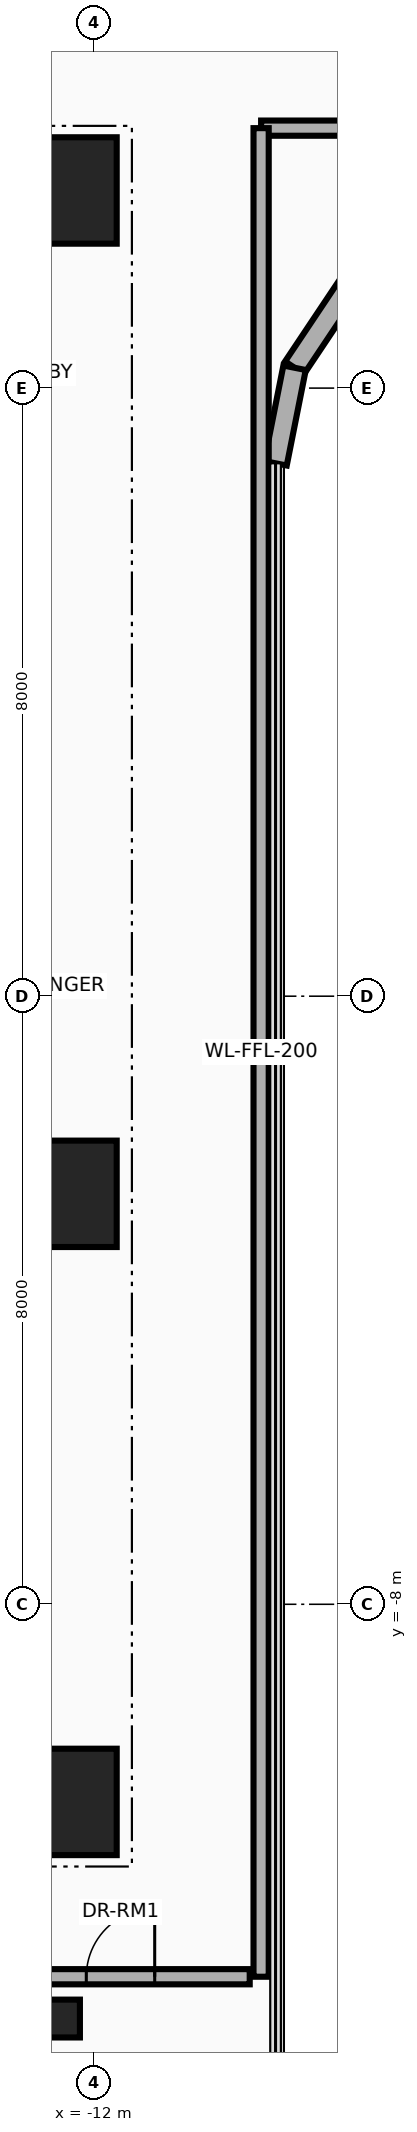
"""IFC4 building model, lengths in metres.
Left out: names, types, materials, properties, quantities, classifications, styles, units other than length and angle.
Written with IfcOpenShell. Run it as: python <this file> out.ifc"""

import sys

from ifc_helpers import new_model, si_unit, direction, frame, frame_2d, origin, origin_2d, place, context, subcontext, project, spatial, rectangle, i_section, extrude, source, transform, mapped, element, fill, save


model = new_model("IFC4")
c1 = context("Model", 3, precision=1e-05, world=origin(), true_north=direction((0.0, 1.0)))
c2 = subcontext(c1, "Body", "Model", "MODEL_VIEW")
j1 = project(units=[si_unit("LENGTHUNIT", "METRE"), si_unit("PLANEANGLEUNIT", "RADIAN")], contexts=[c1])
p1 = place(None, origin())
s1 = spatial("IfcSite", under=j1, at=p1, CompositionType="ELEMENT")
p2 = place(p1, origin())
s2 = spatial("IfcBuilding", under=s1, at=p2, CompositionType="ELEMENT")
p3 = place(p2, frame((0.0, 0.0, 96.3)))
s3 = spatial("IfcBuildingStorey", under=s2, at=p3, CompositionType="ELEMENT", Elevation=96.3)
for number, where, z_axis, x_axis in (
    (1, (-22.65, 10.8, 0.0), (0.0, 0.0, 1.0), (1.0, 0.0, 0.0)),
    (2, (-22.65, -10.8, 0.0), (0.0, 0.0, 1.0), (1.0, 0.0, 0.0)),
):
    element("IfcWall", number, at=place(p3, frame(where, z_axis=z_axis, x_axis=x_axis)), inside=s3, PredefinedType="SHEAR", context=c2, shape_type="SweptSolid", body=[
        extrude(rectangle(XDim=10.25, YDim=0.7, at=frame_2d((5.125, 0.0))), origin(), (0.0, 0.0, 1.0), 4.56),
    ])
m1 = source(origin(), c2, "Body", "SweptSolid", [
    extrude(rectangle(XDim=1.4, YDim=1.4, at=origin_2d()), origin(), (0.0, 0.0, 1.0), 4.8),
])
for number, where, z_axis, x_axis in (
    (3, (-12.4, -10.6, 0.0), (0.0, 0.0, 1.0), (1.0, 0.0, 0.0)),
    (4, (-12.4, -2.6, 0.0), (0.0, 0.0, 1.0), (1.0, 0.0, 0.0)),
    (5, (-12.4, 10.6, 0.0), (0.0, 0.0, 1.0), (1.0, 0.0, 0.0)),
):
    element("IfcColumn", number, at=place(p3, frame(where, z_axis=z_axis, x_axis=x_axis)), inside=s3, PredefinedType="COLUMN", context=c2, shape_type="MappedRepresentation", body=[
        mapped(m1, transform((0.0, 0.0, 0.0), x_axis=(1.0, 0.0, 0.0), y_axis=(0.0, 1.0, 0.0), z_axis=(0.0, 0.0, 1.0), scale=1.0)),
    ])
m2 = source(origin(), c2, "Body", "SweptSolid", [
    extrude(i_section(OverallWidth=0.432, OverallDepth=0.498, WebThickness=0.056, FlangeThickness=0.089, at=origin_2d()), origin(), (0.0, 0.0, 1.0), 4.8),
])
p4 = place(p3, frame((-12.4, -13.45, 0.0), z_axis=(0.0, 0.0, 1.0), x_axis=(1.0, 0.0, 0.0)))
e6 = element("IfcColumn", 6, at=p4, inside=s3, PredefinedType="COLUMN", context=c2, shape_type="MappedRepresentation", body=[
    mapped(m2, transform((0.0, 0.0, 0.0), x_axis=(1.0, 0.0, 0.0), y_axis=(0.0, 1.0, 0.0), z_axis=(0.0, 0.0, 1.0), scale=1.0)),
])
p5 = place(p3, frame((-8.642, 9.342, 0.0), z_axis=(0.0, 0.0, 1.0), x_axis=(-0.555615398575, -0.831439431869, 0.0)))
e7 = element("IfcWall", 7, at=p5, inside=s3, PredefinedType="SOLIDWALL", context=c2, shape_type="SweptSolid", body=[
    extrude(rectangle(XDim=1.292, YDim=0.3, at=frame_2d((0.646, 0.0))), origin(), (0.0, 0.0, 1.0), 4.56),
])
p6 = place(p3, frame((-9.36, 8.268, 0.0), z_axis=(0.0, 0.0, 1.0), x_axis=(-0.195090163074, -0.980785312019, 0.0)))
e8 = element("IfcWall", 8, at=p6, inside=s3, PredefinedType="SOLIDWALL", context=c2, shape_type="SweptSolid", body=[
    extrude(rectangle(XDim=1.281, YDim=0.3, at=frame_2d((0.641, 0.0))), origin(), (0.0, 0.0, 1.0), 4.56),
])
p7 = place(p3, frame((-22.0, -12.9, 0.0), z_axis=(0.0, 0.0, 1.0), x_axis=(1.0, 0.0, 0.0)))
e9 = element("IfcWall", 9, at=p7, inside=s3, PredefinedType="PARTITIONING", context=c2, shape_type="SweptSolid", body=[
    extrude(rectangle(XDim=12.05, YDim=0.2, at=frame_2d((6.025, 0.0))), origin(), (0.0, 0.0, 1.0), 3.934),
])
p8 = place(p7, frame((1.4, 0.0, 0.0)))
e10 = element("IfcOpeningElement", 10, at=p8, cuts=e9, PredefinedType="OPENING", context=c2, shape_type="SweptSolid", body=[
    extrude(rectangle(XDim=0.9, YDim=2.1, at=frame_2d((0.45, 1.05))), frame((0.0, 0.115, 0.0), z_axis=(0.0, -1.0, 0.0), x_axis=(1.0, 0.0, 0.0)), (0.0, 0.0, 1.0), 0.23),
])
p9 = place(p7, frame((5.4, 0.0, 0.0)))
e11 = element("IfcOpeningElement", 11, at=p9, cuts=e9, PredefinedType="OPENING", context=c2, shape_type="SweptSolid", body=[
    extrude(rectangle(XDim=0.9, YDim=2.1, at=frame_2d((0.45, 1.05))), frame((0.0, 0.115, 0.0), z_axis=(0.0, -1.0, 0.0), x_axis=(1.0, 0.0, 0.0)), (0.0, 0.0, 1.0), 0.23),
])
p10 = place(p7, frame((9.9, 0.0, 0.0)))
e12 = element("IfcOpeningElement", 12, at=p10, cuts=e9, PredefinedType="OPENING", context=c2, shape_type="SweptSolid", body=[
    extrude(rectangle(XDim=0.9, YDim=2.1, at=frame_2d((0.45, 1.05))), frame((0.0, 0.115, 0.0), z_axis=(0.0, -1.0, 0.0), x_axis=(1.0, 0.0, 0.0)), (0.0, 0.0, 1.0), 0.23),
])
p11 = place(p3, frame((-9.8, 11.42, 0.0), z_axis=(0.0, 0.0, 1.0), x_axis=(1.0, 0.0, 0.0)))
e13 = element("IfcWall", 13, at=p11, inside=s3, PredefinedType="PARTITIONING", context=c2, shape_type="SweptSolid", body=[
    extrude(rectangle(XDim=38.75, YDim=0.2, at=frame_2d((19.375, 0.0))), origin(), (0.0, 0.0, 1.0), 3.766),
])
p12 = place(p3, frame((-9.8, -12.9, 0.0), z_axis=(0.0, 0.0, 1.0), x_axis=(0.0, 1.0, 0.0)))
e14 = element("IfcWall", 14, at=p12, inside=s3, PredefinedType="PARTITIONING", context=c2, shape_type="SweptSolid", body=[
    extrude(rectangle(XDim=24.32, YDim=0.2, at=frame_2d((12.16, 0.0))), origin(), (0.0, 0.0, 1.0), 3.766),
])
p13 = place(p10, origin())
e15 = element("IfcDoor", 15, at=p13, inside=s3, OperationType="SINGLE_SWING_RIGHT", PredefinedType="DOOR", context=c2, shape_type="SweptSolid", body=[
    extrude(rectangle(XDim=0.9, YDim=2.1, at=frame_2d((0.45, 1.05))), frame((0.0, 0.025, 0.0), z_axis=(0.0, -1.0, 0.0), x_axis=(1.0, 0.0, 0.0)), (0.0, 0.0, 1.0), 0.05),
])
fill(e12, e15)
save(model, sys.argv[1])
